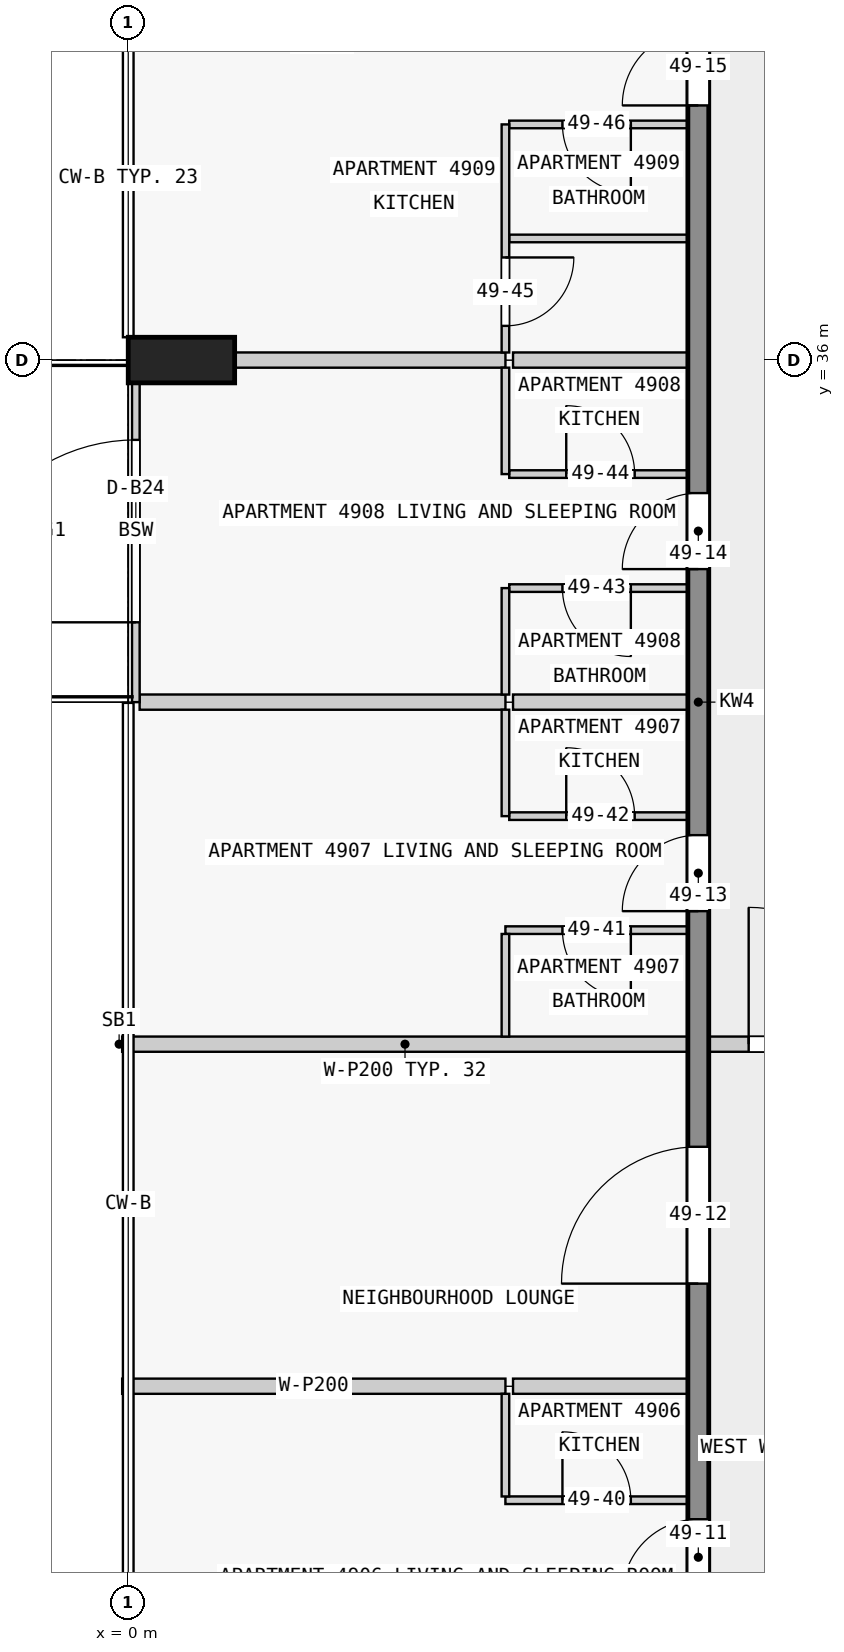
"""IFC4 building model, lengths in metres.
Left out: names, types, materials, properties, quantities, classifications, styles, units other than length and angle.
Written with IfcOpenShell. Run it as: python <this file> out.ifc"""

import sys

from ifc_helpers import new_model, si_unit, direction, frame, frame_2d, origin, origin_2d, place, context, subcontext, project, spatial, rectangle, extrude, element, fill, save


model = new_model("IFC4")
c1 = context("Model", 3, precision=1e-05, world=origin(), true_north=direction((0.0, 1.0)))
c2 = subcontext(c1, "Body", "Model", "MODEL_VIEW")
j1 = project(units=[si_unit("LENGTHUNIT", "METRE"), si_unit("PLANEANGLEUNIT", "RADIAN")], contexts=[c1])
p1 = place(None, origin())
s1 = spatial("IfcSite", under=j1, at=p1, CompositionType="ELEMENT")
p2 = place(p1, origin())
s2 = spatial("IfcBuilding", under=s1, at=p2, CompositionType="ELEMENT")
p3 = place(p2, frame((0.0, 0.0, 190.9)))
s3 = spatial("IfcBuildingStorey", under=s2, at=p3, CompositionType="ELEMENT", Elevation=190.9)
p4 = place(p3, frame((0.7, 36.0, 0.0), z_axis=(0.0, 0.0, 1.0), x_axis=(0.0, 1.0, 0.0)))
e1 = element("IfcColumn", 1, at=p4, inside=s3, PredefinedType="COLUMN", context=c2, shape_type="SweptSolid", body=[
    extrude(rectangle(XDim=0.6, YDim=1.4, at=origin_2d()), origin(), (0.0, 0.0, 1.0), 3.5),
])
p5 = place(p3, frame((7.5, 18.0, 0.0), z_axis=(0.0, 0.0, 1.0), x_axis=(0.0, 1.0, 0.0)))
e2 = element("IfcWall", 2, at=p5, inside=s3, PredefinedType="SHEAR", context=c2, shape_type="SweptSolid", body=[
    extrude(rectangle(XDim=27.0, YDim=0.275, at=frame_2d((13.5, 0.0))), origin(), (0.0, 0.0, 1.0), 3.25),
])
p6 = place(p5, frame((1.75, 0.0, 0.0)))
e3 = element("IfcOpeningElement", 3, at=p6, cuts=e2, PredefinedType="OPENING", context=c2, shape_type="SweptSolid", body=[
    extrude(rectangle(XDim=1.0, YDim=2.1, at=frame_2d((0.5, 1.05))), frame((0.0, 0.147, 0.0), z_axis=(0.0, -1.0, 0.0), x_axis=(1.0, 0.0, 0.0)), (0.0, 0.0, 1.0), 0.295),
])
p7 = place(p5, frame((5.85, 0.0, 0.0)))
e4 = element("IfcOpeningElement", 4, at=p7, cuts=e2, PredefinedType="OPENING", context=c2, shape_type="SweptSolid", body=[
    extrude(rectangle(XDim=1.8, YDim=2.1, at=frame_2d((0.9, 1.05))), frame((0.0, 0.147, 0.0), z_axis=(0.0, -1.0, 0.0), x_axis=(1.0, 0.0, 0.0)), (0.0, 0.0, 1.0), 0.295),
])
p8 = place(p5, frame((10.75, 0.0, 0.0)))
e5 = element("IfcOpeningElement", 5, at=p8, cuts=e2, PredefinedType="OPENING", context=c2, shape_type="SweptSolid", body=[
    extrude(rectangle(XDim=1.0, YDim=2.1, at=frame_2d((0.5, 1.05))), frame((0.0, 0.147, 0.0), z_axis=(0.0, -1.0, 0.0), x_axis=(1.0, 0.0, 0.0)), (0.0, 0.0, 1.0), 0.295),
])
p9 = place(p5, frame((15.25, 0.0, 0.0)))
e6 = element("IfcOpeningElement", 6, at=p9, cuts=e2, PredefinedType="OPENING", context=c2, shape_type="SweptSolid", body=[
    extrude(rectangle(XDim=1.0, YDim=2.1, at=frame_2d((0.5, 1.05))), frame((0.0, 0.147, 0.0), z_axis=(0.0, -1.0, 0.0), x_axis=(1.0, 0.0, 0.0)), (0.0, 0.0, 1.0), 0.295),
])
p10 = place(p5, frame((21.35, 0.0, 0.0)))
e7 = element("IfcOpeningElement", 7, at=p10, cuts=e2, PredefinedType="OPENING", context=c2, shape_type="SweptSolid", body=[
    extrude(rectangle(XDim=1.0, YDim=2.1, at=frame_2d((0.5, 1.05))), frame((0.0, 0.147, 0.0), z_axis=(0.0, -1.0, 0.0), x_axis=(1.0, 0.0, 0.0)), (0.0, 0.0, 1.0), 0.295),
])
p11 = place(p3, frame((0.1, 31.5, 0.0), z_axis=(0.0, 0.0, 1.0), x_axis=(0.0, 1.0, 0.0)))
e8 = element("IfcWall", 8, at=p11, inside=s3, PredefinedType="STANDARD", context=c2, shape_type="SweptSolid", body=[
    extrude(rectangle(XDim=4.5, YDim=0.1, at=frame_2d((2.25, 0.0))), origin(), (0.0, 0.0, 1.0), 3.25),
])
p12 = place(p11, frame((1.05, 0.0, 0.0)))
e9 = element("IfcOpeningElement", 9, at=p12, cuts=e8, PredefinedType="OPENING", context=c2, shape_type="SweptSolid", body=[
    extrude(rectangle(XDim=2.4, YDim=2.4, at=frame_2d((1.2, 1.2))), frame((0.0, 0.06, 0.0), z_axis=(0.0, -1.0, 0.0), x_axis=(1.0, 0.0, 0.0)), (0.0, 0.0, 1.0), 0.12),
])
p13 = place(p3, frame((4.962, 21.0, 0.0), z_axis=(0.0, 0.0, 1.0), x_axis=(1.0, 0.0, 0.0)))
e10 = element("IfcWall", 10, at=p13, inside=s3, PredefinedType="PARTITIONING", context=c2, shape_type="SweptSolid", body=[
    extrude(rectangle(XDim=2.4, YDim=0.1, at=frame_2d((1.2, 0.0))), origin(), (0.0, 0.0, 1.0), 3.25),
])
p14 = place(p13, frame((0.75, 0.0, 0.0)))
e11 = element("IfcOpeningElement", 11, at=p14, cuts=e10, PredefinedType="OPENING", context=c2, shape_type="SweptSolid", body=[
    extrude(rectangle(XDim=0.9, YDim=2.1, at=frame_2d((0.45, 1.05))), frame((0.0, 0.06, 0.0), z_axis=(0.0, -1.0, 0.0), x_axis=(1.0, 0.0, 0.0)), (0.0, 0.0, 1.0), 0.12),
])
p15 = place(p3, frame((7.363, 22.5, 0.0), z_axis=(0.0, 0.0, 1.0), x_axis=(-1.0, 0.0, 0.0)))
e12 = element("IfcWall", 12, at=p15, inside=s3, PredefinedType="PARTITIONING", context=c2, shape_type="SweptSolid", body=[
    extrude(rectangle(XDim=2.3, YDim=0.2, at=frame_2d((1.15, 0.0))), origin(), (0.0, 0.0, 1.0), 3.25),
])
p16 = place(p3, frame((-0.08, 22.5, 0.0), z_axis=(0.0, 0.0, 1.0), x_axis=(1.0, 0.0, 0.0)))
e13 = element("IfcWall", 13, at=p16, inside=s3, PredefinedType="PARTITIONING", context=c2, shape_type="SweptSolid", body=[
    extrude(rectangle(XDim=5.042, YDim=0.2, at=frame_2d((2.521, 0.0))), origin(), (0.0, 0.0, 1.0), 3.25),
])
p17 = place(p3, frame((7.363, 27.0, 0.0), z_axis=(0.0, 0.0, 1.0), x_axis=(-1.0, 0.0, 0.0)))
e14 = element("IfcWall", 14, at=p17, inside=s3, PredefinedType="PARTITIONING", context=c2, shape_type="SweptSolid", body=[
    extrude(rectangle(XDim=7.443, YDim=0.2, at=frame_2d((3.721, 0.0))), origin(), (0.0, 0.0, 1.0), 3.25),
])
p18 = place(p3, frame((7.363, 28.5, 0.0), z_axis=(0.0, 0.0, 1.0), x_axis=(-1.0, 0.0, 0.0)))
e15 = element("IfcWall", 15, at=p18, inside=s3, PredefinedType="PARTITIONING", context=c2, shape_type="SweptSolid", body=[
    extrude(rectangle(XDim=2.4, YDim=0.1, at=frame_2d((1.2, 0.0))), origin(), (0.0, 0.0, 1.0), 3.25),
])
p19 = place(p18, frame((0.75, 0.0, 0.0)))
e16 = element("IfcOpeningElement", 16, at=p19, cuts=e15, PredefinedType="OPENING", context=c2, shape_type="SweptSolid", body=[
    extrude(rectangle(XDim=0.9, YDim=2.1, at=frame_2d((0.45, 1.05))), frame((0.0, 0.06, 0.0), z_axis=(0.0, -1.0, 0.0), x_axis=(1.0, 0.0, 0.0)), (0.0, 0.0, 1.0), 0.12),
])
p20 = place(p3, frame((5.012, 30.0, 0.0), z_axis=(0.0, 0.0, 1.0), x_axis=(1.0, 0.0, 0.0)))
e17 = element("IfcWall", 17, at=p20, inside=s3, PredefinedType="PARTITIONING", context=c2, shape_type="SweptSolid", body=[
    extrude(rectangle(XDim=2.35, YDim=0.1, at=frame_2d((1.175, 0.0))), origin(), (0.0, 0.0, 1.0), 3.25),
])
p21 = place(p20, frame((0.75, 0.0, 0.0)))
e18 = element("IfcOpeningElement", 18, at=p21, cuts=e17, PredefinedType="OPENING", context=c2, shape_type="SweptSolid", body=[
    extrude(rectangle(XDim=0.9, YDim=2.1, at=frame_2d((0.45, 1.05))), frame((0.0, 0.06, 0.0), z_axis=(0.0, -1.0, 0.0), x_axis=(1.0, 0.0, 0.0)), (0.0, 0.0, 1.0), 0.12),
])
p22 = place(p3, frame((7.363, 31.5, 0.0), z_axis=(0.0, 0.0, 1.0), x_axis=(-1.0, 0.0, 0.0)))
e19 = element("IfcWall", 19, at=p22, inside=s3, PredefinedType="PARTITIONING", context=c2, shape_type="SweptSolid", body=[
    extrude(rectangle(XDim=2.3, YDim=0.2, at=frame_2d((1.15, 0.0))), origin(), (0.0, 0.0, 1.0), 3.25),
])
p23 = place(p3, frame((0.15, 31.5, 0.0), z_axis=(0.0, 0.0, 1.0), x_axis=(1.0, 0.0, 0.0)))
e20 = element("IfcWall", 20, at=p23, inside=s3, PredefinedType="PARTITIONING", context=c2, shape_type="SweptSolid", body=[
    extrude(rectangle(XDim=4.812, YDim=0.2, at=frame_2d((2.406, 0.0))), origin(), (0.0, 0.0, 1.0), 3.25),
])
p24 = place(p3, frame((7.363, 33.0, 0.0), z_axis=(0.0, 0.0, 1.0), x_axis=(-1.0, 0.0, 0.0)))
e21 = element("IfcWall", 21, at=p24, inside=s3, PredefinedType="PARTITIONING", context=c2, shape_type="SweptSolid", body=[
    extrude(rectangle(XDim=2.35, YDim=0.1, at=frame_2d((1.175, 0.0))), origin(), (0.0, 0.0, 1.0), 3.25),
])
p25 = place(p24, frame((0.75, 0.0, 0.0)))
e22 = element("IfcOpeningElement", 22, at=p25, cuts=e21, PredefinedType="OPENING", context=c2, shape_type="SweptSolid", body=[
    extrude(rectangle(XDim=0.9, YDim=2.1, at=frame_2d((0.45, 1.05))), frame((0.0, 0.06, 0.0), z_axis=(0.0, -1.0, 0.0), x_axis=(1.0, 0.0, 0.0)), (0.0, 0.0, 1.0), 0.12),
])
p26 = place(p3, frame((5.012, 34.5, 0.0), z_axis=(0.0, 0.0, 1.0), x_axis=(1.0, 0.0, 0.0)))
e23 = element("IfcWall", 23, at=p26, inside=s3, PredefinedType="PARTITIONING", context=c2, shape_type="SweptSolid", body=[
    extrude(rectangle(XDim=2.35, YDim=0.1, at=frame_2d((1.175, 0.0))), origin(), (0.0, 0.0, 1.0), 3.25),
])
p27 = place(p26, frame((0.75, 0.0, 0.0)))
e24 = element("IfcOpeningElement", 24, at=p27, cuts=e23, PredefinedType="OPENING", context=c2, shape_type="SweptSolid", body=[
    extrude(rectangle(XDim=0.9, YDim=2.1, at=frame_2d((0.45, 1.05))), frame((0.0, 0.06, 0.0), z_axis=(0.0, -1.0, 0.0), x_axis=(1.0, 0.0, 0.0)), (0.0, 0.0, 1.0), 0.12),
])
p28 = place(p3, frame((7.363, 36.0, 0.0), z_axis=(0.0, 0.0, 1.0), x_axis=(-1.0, 0.0, 0.0)))
e25 = element("IfcWall", 25, at=p28, inside=s3, PredefinedType="PARTITIONING", context=c2, shape_type="SweptSolid", body=[
    extrude(rectangle(XDim=2.3, YDim=0.2, at=frame_2d((1.15, 0.0))), origin(), (0.0, 0.0, 1.0), 3.25),
])
p29 = place(p3, frame((1.4, 36.0, 0.0), z_axis=(0.0, 0.0, 1.0), x_axis=(1.0, 0.0, 0.0)))
e26 = element("IfcWall", 26, at=p29, inside=s3, PredefinedType="PARTITIONING", context=c2, shape_type="SweptSolid", body=[
    extrude(rectangle(XDim=3.562, YDim=0.2, at=frame_2d((1.781, 0.0))), origin(), (0.0, 0.0, 1.0), 3.25),
])
p30 = place(p3, frame((7.363, 37.6, 0.0), z_axis=(0.0, 0.0, 1.0), x_axis=(-1.0, 0.0, 0.0)))
e27 = element("IfcWall", 27, at=p30, inside=s3, PredefinedType="PARTITIONING", context=c2, shape_type="SweptSolid", body=[
    extrude(rectangle(XDim=2.35, YDim=0.1, at=frame_2d((1.175, 0.0))), origin(), (0.0, 0.0, 1.0), 3.25),
])
p31 = place(p3, frame((7.363, 39.1, 0.0), z_axis=(0.0, 0.0, 1.0), x_axis=(-1.0, 0.0, 0.0)))
e28 = element("IfcWall", 28, at=p31, inside=s3, PredefinedType="PARTITIONING", context=c2, shape_type="SweptSolid", body=[
    extrude(rectangle(XDim=2.35, YDim=0.1, at=frame_2d((1.175, 0.0))), origin(), (0.0, 0.0, 1.0), 3.25),
])
p32 = place(p31, frame((0.75, 0.0, 0.0)))
e29 = element("IfcOpeningElement", 29, at=p32, cuts=e28, PredefinedType="OPENING", context=c2, shape_type="SweptSolid", body=[
    extrude(rectangle(XDim=0.9, YDim=2.1, at=frame_2d((0.45, 1.05))), frame((0.0, 0.06, 0.0), z_axis=(0.0, -1.0, 0.0), x_axis=(1.0, 0.0, 0.0)), (0.0, 0.0, 1.0), 0.12),
])
for number, where, z_axis, x_axis in (
    (30, (4.962, 22.4, 0.0), (0.0, 0.0, 1.0), (0.0, -1.0, 0.0)),
    (31, (4.962, 28.45, 0.0), (0.0, 0.0, 1.0), (0.0, -1.0, 0.0)),
):
    element("IfcWall", number, at=place(p3, frame(where, z_axis=z_axis, x_axis=x_axis)), inside=s3, PredefinedType="PARTITIONING", context=c2, shape_type="SweptSolid", body=[
        extrude(rectangle(XDim=1.35, YDim=0.1, at=frame_2d((0.675, 0.0))), origin(), (0.0, 0.0, 1.0), 3.25),
    ])
for number, where, z_axis, x_axis in (
    (32, (4.962, 31.4, 0.0), (0.0, 0.0, 1.0), (0.0, -1.0, 0.0)),
    (33, (4.962, 33.0, 0.0), (0.0, 0.0, 1.0), (0.0, -1.0, 0.0)),
    (34, (4.962, 35.9, 0.0), (0.0, 0.0, 1.0), (0.0, -1.0, 0.0)),
):
    element("IfcWall", number, at=place(p3, frame(where, z_axis=z_axis, x_axis=x_axis)), inside=s3, PredefinedType="PARTITIONING", context=c2, shape_type="SweptSolid", body=[
        extrude(rectangle(XDim=1.4, YDim=0.1, at=frame_2d((0.7, 0.0))), origin(), (0.0, 0.0, 1.0), 3.25),
    ])
p33 = place(p3, frame((4.962, 39.1, 0.0), z_axis=(0.0, 0.0, 1.0), x_axis=(0.0, -1.0, 0.0)))
e35 = element("IfcWall", 35, at=p33, inside=s3, PredefinedType="PARTITIONING", context=c2, shape_type="SweptSolid", body=[
    extrude(rectangle(XDim=3.0, YDim=0.1, at=frame_2d((1.5, 0.0))), origin(), (0.0, 0.0, 1.0), 3.25),
])
p34 = place(p33, frame((1.75, 0.0, 0.0)))
e36 = element("IfcOpeningElement", 36, at=p34, cuts=e35, PredefinedType="OPENING", context=c2, shape_type="SweptSolid", body=[
    extrude(rectangle(XDim=0.9, YDim=2.1, at=frame_2d((0.45, 1.05))), frame((0.0, 0.06, 0.0), z_axis=(0.0, -1.0, 0.0), x_axis=(1.0, 0.0, 0.0)), (0.0, 0.0, 1.0), 0.12),
])
p35 = place(p3, frame((7.462, 27.0, 0.0), z_axis=(0.0, 0.0, 1.0), x_axis=(1.0, 0.0, 0.0)))
e37 = element("IfcWall", 37, at=p35, inside=s3, PredefinedType="PARTITIONING", context=c2, shape_type="SweptSolid", body=[
    extrude(rectangle(XDim=3.175, YDim=0.2, at=frame_2d((1.587, 0.0))), origin(), (0.0, 0.0, 1.0), 3.25),
])
p36 = place(p35, frame((0.7, 0.0, 0.0)))
e38 = element("IfcOpeningElement", 38, at=p36, cuts=e37, PredefinedType="OPENING", context=c2, shape_type="SweptSolid", body=[
    extrude(rectangle(XDim=1.8, YDim=2.1, at=frame_2d((0.9, 1.05))), frame((0.0, 0.11, 0.0), z_axis=(0.0, -1.0, 0.0), x_axis=(1.0, 0.0, 0.0)), (0.0, 0.0, 1.0), 0.22),
])
p37 = place(p12, origin())
e39 = element("IfcDoor", 39, at=p37, inside=s3, OperationType="SINGLE_SWING_LEFT", PredefinedType="DOOR", context=c2, shape_type="SweptSolid", body=[
    extrude(rectangle(XDim=2.4, YDim=2.4, at=frame_2d((1.2, 1.2))), frame((0.0, 0.025, 0.0), z_axis=(0.0, -1.0, 0.0), x_axis=(1.0, 0.0, 0.0)), (0.0, 0.0, 1.0), 0.05),
])
fill(e9, e39)
p38 = place(p6, origin())
e40 = element("IfcDoor", 40, at=p38, inside=s3, OperationType="SINGLE_SWING_LEFT", PredefinedType="DOOR", context=c2, shape_type="SweptSolid", body=[
    extrude(rectangle(XDim=1.0, YDim=2.1, at=frame_2d((0.5, 1.05))), frame((0.0, 0.025, 0.0), z_axis=(0.0, -1.0, 0.0), x_axis=(1.0, 0.0, 0.0)), (0.0, 0.0, 1.0), 0.05),
])
fill(e3, e40)
p39 = place(p7, origin())
e41 = element("IfcDoor", 41, at=p39, inside=s3, OperationType="SINGLE_SWING_LEFT", PredefinedType="DOOR", context=c2, shape_type="SweptSolid", body=[
    extrude(rectangle(XDim=1.8, YDim=2.1, at=frame_2d((0.9, 1.05))), frame((0.0, 0.025, 0.0), z_axis=(0.0, -1.0, 0.0), x_axis=(1.0, 0.0, 0.0)), (0.0, 0.0, 1.0), 0.05),
])
fill(e4, e41)
p40 = place(p8, origin())
e42 = element("IfcDoor", 42, at=p40, inside=s3, OperationType="SINGLE_SWING_LEFT", PredefinedType="DOOR", context=c2, shape_type="SweptSolid", body=[
    extrude(rectangle(XDim=1.0, YDim=2.1, at=frame_2d((0.5, 1.05))), frame((0.0, 0.025, 0.0), z_axis=(0.0, -1.0, 0.0), x_axis=(1.0, 0.0, 0.0)), (0.0, 0.0, 1.0), 0.05),
])
fill(e5, e42)
p41 = place(p9, origin())
e43 = element("IfcDoor", 43, at=p41, inside=s3, OperationType="SINGLE_SWING_RIGHT", PredefinedType="DOOR", context=c2, shape_type="SweptSolid", body=[
    extrude(rectangle(XDim=1.0, YDim=2.1, at=frame_2d((0.5, 1.05))), frame((0.0, 0.025, 0.0), z_axis=(0.0, -1.0, 0.0), x_axis=(1.0, 0.0, 0.0)), (0.0, 0.0, 1.0), 0.05),
])
fill(e6, e43)
p42 = place(p10, origin())
e44 = element("IfcDoor", 44, at=p42, inside=s3, OperationType="SINGLE_SWING_RIGHT", PredefinedType="DOOR", context=c2, shape_type="SweptSolid", body=[
    extrude(rectangle(XDim=1.0, YDim=2.1, at=frame_2d((0.5, 1.05))), frame((0.0, 0.025, 0.0), z_axis=(0.0, -1.0, 0.0), x_axis=(1.0, 0.0, 0.0)), (0.0, 0.0, 1.0), 0.05),
])
fill(e7, e44)
p43 = place(p36, origin())
e45 = element("IfcDoor", 45, at=p43, inside=s3, OperationType="SINGLE_SWING_RIGHT", PredefinedType="DOOR", context=c2, shape_type="SweptSolid", body=[
    extrude(rectangle(XDim=1.8, YDim=2.1, at=frame_2d((0.9, 1.05))), frame((0.0, 0.025, 0.0), z_axis=(0.0, -1.0, 0.0), x_axis=(1.0, 0.0, 0.0)), (0.0, 0.0, 1.0), 0.05),
])
fill(e38, e45)
p44 = place(p14, origin())
e46 = element("IfcDoor", 46, at=p44, inside=s3, OperationType="SINGLE_SWING_RIGHT", PredefinedType="DOOR", context=c2, shape_type="SweptSolid", body=[
    extrude(rectangle(XDim=0.9, YDim=2.1, at=frame_2d((0.45, 1.05))), frame((0.0, 0.025, 0.0), z_axis=(0.0, -1.0, 0.0), x_axis=(1.0, 0.0, 0.0)), (0.0, 0.0, 1.0), 0.05),
])
fill(e11, e46)
p45 = place(p19, origin())
e47 = element("IfcDoor", 47, at=p45, inside=s3, OperationType="SINGLE_SWING_RIGHT", PredefinedType="DOOR", context=c2, shape_type="SweptSolid", body=[
    extrude(rectangle(XDim=0.9, YDim=2.1, at=frame_2d((0.45, 1.05))), frame((0.0, 0.025, 0.0), z_axis=(0.0, -1.0, 0.0), x_axis=(1.0, 0.0, 0.0)), (0.0, 0.0, 1.0), 0.05),
])
fill(e16, e47)
p46 = place(p21, origin())
e48 = element("IfcDoor", 48, at=p46, inside=s3, OperationType="SINGLE_SWING_RIGHT", PredefinedType="DOOR", context=c2, shape_type="SweptSolid", body=[
    extrude(rectangle(XDim=0.9, YDim=2.1, at=frame_2d((0.45, 1.05))), frame((0.0, 0.025, 0.0), z_axis=(0.0, -1.0, 0.0), x_axis=(1.0, 0.0, 0.0)), (0.0, 0.0, 1.0), 0.05),
])
fill(e18, e48)
p47 = place(p25, origin())
e49 = element("IfcDoor", 49, at=p47, inside=s3, OperationType="SINGLE_SWING_RIGHT", PredefinedType="DOOR", context=c2, shape_type="SweptSolid", body=[
    extrude(rectangle(XDim=0.9, YDim=2.1, at=frame_2d((0.45, 1.05))), frame((0.0, 0.025, 0.0), z_axis=(0.0, -1.0, 0.0), x_axis=(1.0, 0.0, 0.0)), (0.0, 0.0, 1.0), 0.05),
])
fill(e22, e49)
p48 = place(p27, origin())
e50 = element("IfcDoor", 50, at=p48, inside=s3, OperationType="SINGLE_SWING_RIGHT", PredefinedType="DOOR", context=c2, shape_type="SweptSolid", body=[
    extrude(rectangle(XDim=0.9, YDim=2.1, at=frame_2d((0.45, 1.05))), frame((0.0, 0.025, 0.0), z_axis=(0.0, -1.0, 0.0), x_axis=(1.0, 0.0, 0.0)), (0.0, 0.0, 1.0), 0.05),
])
fill(e24, e50)
p49 = place(p34, origin())
e51 = element("IfcDoor", 51, at=p49, inside=s3, OperationType="SINGLE_SWING_RIGHT", PredefinedType="DOOR", context=c2, shape_type="SweptSolid", body=[
    extrude(rectangle(XDim=0.9, YDim=2.1, at=frame_2d((0.45, 1.05))), frame((0.0, 0.025, 0.0), z_axis=(0.0, -1.0, 0.0), x_axis=(1.0, 0.0, 0.0)), (0.0, 0.0, 1.0), 0.05),
])
fill(e36, e51)
p50 = place(p32, origin())
e52 = element("IfcDoor", 52, at=p50, inside=s3, OperationType="SINGLE_SWING_RIGHT", PredefinedType="DOOR", context=c2, shape_type="SweptSolid", body=[
    extrude(rectangle(XDim=0.9, YDim=2.1, at=frame_2d((0.45, 1.05))), frame((0.0, 0.025, 0.0), z_axis=(0.0, -1.0, 0.0), x_axis=(1.0, 0.0, 0.0)), (0.0, 0.0, 1.0), 0.05),
])
fill(e29, e52)
save(model, sys.argv[1])
